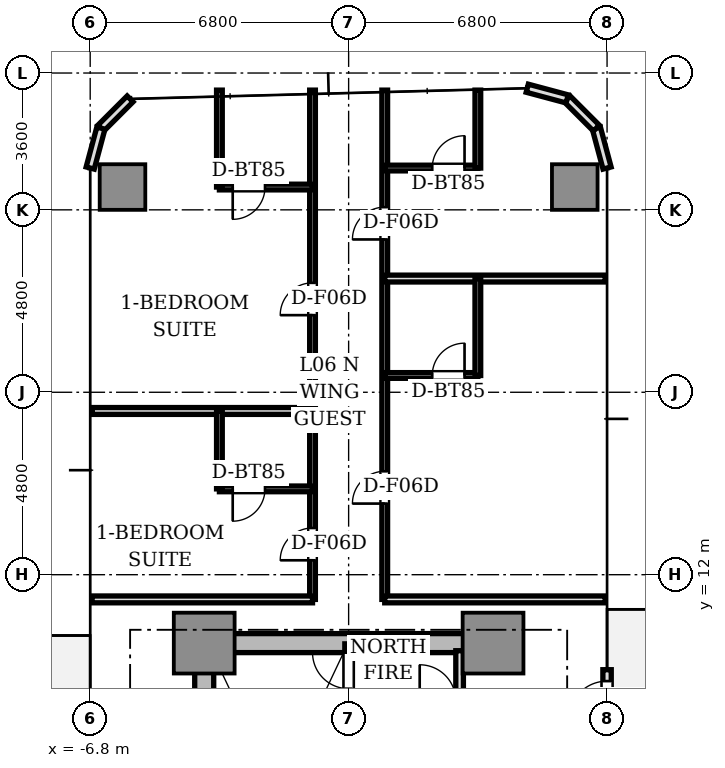
"""IFC4 building model, lengths in metres.
Left out: names, types, materials, properties, quantities, classifications, styles, units other than length and angle.
Written with IfcOpenShell. Run it as: python <this file> out.ifc"""

import sys

from ifc_helpers import new_model, si_unit, direction, frame, frame_2d, origin, origin_2d, place, context, subcontext, project, spatial, rectangle, extrude, source, transform, mapped, element, fill, save


model = new_model("IFC4")
c1 = context("Model", 3, precision=1e-05, world=origin(), true_north=direction((0.0, 1.0)))
c2 = subcontext(c1, "Body", "Model", "MODEL_VIEW")
j1 = project(units=[si_unit("LENGTHUNIT", "METRE"), si_unit("PLANEANGLEUNIT", "RADIAN")], contexts=[c1])
p1 = place(None, origin())
s1 = spatial("IfcSite", under=j1, at=p1, CompositionType="ELEMENT")
p2 = place(p1, origin())
s2 = spatial("IfcBuilding", under=s1, at=p2, CompositionType="ELEMENT")
p3 = place(p2, frame((0.0, 0.0, 26.45)))
s3 = spatial("IfcBuildingStorey", under=s2, at=p3, CompositionType="ELEMENT", Elevation=26.45)
p4 = place(p3, frame((-3.55, 10.2, 0.0), z_axis=(0.0, 0.0, 1.0), x_axis=(1.0, 0.0, 0.0)))
e1 = element("IfcWall", 1, at=p4, inside=s3, PredefinedType="SHEAR", context=c2, shape_type="SweptSolid", body=[
    extrude(rectangle(XDim=7.1, YDim=0.5, at=frame_2d((3.55, 0.0))), origin(), (0.0, 0.0, 1.0), 3.11),
])
p5 = place(p3, frame((-3.8, 2.85, 0.0), z_axis=(0.0, 0.0, 1.0), x_axis=(0.0, 1.0, 0.0)))
e2 = element("IfcWall", 2, at=p5, inside=s3, PredefinedType="SHEAR", context=c2, shape_type="SweptSolid", body=[
    extrude(rectangle(XDim=6.9, YDim=0.5, at=frame_2d((3.45, 0.0))), origin(), (0.0, 0.0, 1.0), 3.11),
])
m1 = source(origin(), c2, "Body", "SweptSolid", [
    extrude(rectangle(XDim=1.6, YDim=1.6, at=origin_2d()), origin(), (0.0, 0.0, 1.0), 3.11),
])
for number, where, z_axis, x_axis in (
    (3, (-3.8, 10.2, 0.0), (0.0, 0.0, 1.0), (1.0, 0.0, 0.0)),
    (4, (3.8, 10.2, 0.0), (0.0, 0.0, 1.0), (1.0, 0.0, 0.0)),
):
    element("IfcColumn", number, at=place(p3, frame(where, z_axis=z_axis, x_axis=x_axis)), inside=s3, PredefinedType="COLUMN", context=c2, shape_type="MappedRepresentation", body=[
        mapped(m1, transform((0.0, 0.0, 0.0), scale=1.0)),
    ])
m2 = source(origin(), c2, "Body", "SweptSolid", [
    extrude(rectangle(XDim=1.2, YDim=1.2, at=origin_2d()), origin(), (0.0, 0.0, 1.0), 3.11),
])
for number, where, z_axis, x_axis in (
    (5, (5.95, 22.2, 0.0), (0.0, 0.0, 1.0), (1.0, 0.0, 0.0)),
    (6, (-5.95, 22.2, 0.0), (0.0, 0.0, 1.0), (1.0, 0.0, 0.0)),
):
    element("IfcColumn", number, at=place(p3, frame(where, z_axis=z_axis, x_axis=x_axis)), inside=s3, PredefinedType="COLUMN", context=c2, shape_type="MappedRepresentation", body=[
        mapped(m2, transform((0.0, 0.0, 0.0), scale=1.0)),
    ])
p6 = place(p3, frame((6.8, 6.8, 0.0), z_axis=(0.0, 0.0, 1.0), x_axis=(0.0, 1.0, 0.0)))
e7 = element("IfcWall", 7, at=p6, inside=s3, PredefinedType="STANDARD", context=c2, shape_type="SweptSolid", body=[
    extrude(rectangle(XDim=2.7, YDim=0.22, at=frame_2d((1.35, 0.0))), origin(), (0.0, 0.0, 1.0), 3.11),
])
p7 = place(p6, frame((1.4, 0.0, 0.0)))
e8 = element("IfcOpeningElement", 8, at=p7, cuts=e7, PredefinedType="OPENING", context=c2, shape_type="SweptSolid", body=[
    extrude(rectangle(XDim=1.0, YDim=2.2, at=frame_2d((0.5, 1.1))), frame((0.0, 0.12, 0.0), z_axis=(0.0, -1.0, 0.0), x_axis=(1.0, 0.0, 0.0)), (0.0, 0.0, 1.0), 0.24),
])
for number, where, z_axis, x_axis in (
    (9, (6.8, 22.7, 0.0), (0.0, 0.0, 1.0), (-0.259, 0.966, 0.0)),
    (10, (6.519, 23.75, 0.0), (0.0, 0.0, 1.0), (-0.707, 0.707, 0.0)),
    (11, (5.75, 24.519, 0.0), (0.0, 0.0, 1.0), (-0.966, 0.259, 0.0)),
    (12, (-5.75, 24.519, 0.0), (0.0, 0.0, 1.0), (-0.707, -0.707, 0.0)),
    (13, (-6.519, 23.75, 0.0), (0.0, 0.0, 1.0), (-0.259, -0.966, 0.0)),
):
    element("IfcWall", number, at=place(p3, frame(where, z_axis=z_axis, x_axis=x_axis)), inside=s3, PredefinedType="STANDARD", context=c2, shape_type="SweptSolid", body=[
        extrude(rectangle(XDim=1.087, YDim=0.22, at=frame_2d((0.543, 0.0))), origin(), (0.0, 0.0, 1.0), 3.11),
    ])
p8 = place(p3, frame((0.0, 2.5, 0.0), z_axis=(0.0, 0.0, 1.0), x_axis=(0.0, 1.0, 0.0)))
e14 = element("IfcWall", 14, at=p8, inside=s3, PredefinedType="SOLIDWALL", context=c2, shape_type="SweptSolid", body=[
    extrude(rectangle(XDim=7.68, YDim=0.2, at=frame_2d((3.84, 0.0))), origin(), (0.0, 0.0, 1.0), 3.11),
])
p9 = place(p8, frame((6.5, 0.0, 0.0)))
e15 = element("IfcOpeningElement", 15, at=p9, cuts=e14, PredefinedType="OPENING", context=c2, shape_type="SweptSolid", body=[
    extrude(rectangle(XDim=0.95, YDim=2.15, at=frame_2d((0.475, 1.075))), frame((0.0, 0.11, 0.0), z_axis=(0.0, -1.0, 0.0), x_axis=(1.0, 0.0, 0.0)), (0.0, 0.0, 1.0), 0.22),
])
p10 = place(p3, frame((2.92, 8.68, 0.0), z_axis=(0.0, 0.0, 1.0), x_axis=(0.0, 1.0, 0.0)))
e16 = element("IfcWall", 16, at=p10, inside=s3, PredefinedType="SOLIDWALL", context=c2, shape_type="SweptSolid", body=[
    extrude(rectangle(XDim=1.32, YDim=0.2, at=frame_2d((0.66, 0.0))), origin(), (0.0, 0.0, 1.0), 2.66),
])
p11 = place(p3, frame((-0.95, 11.35, 0.0), z_axis=(0.0, 0.0, 1.0), x_axis=(0.0, 1.0, 0.0)))
e17 = element("IfcWall", 17, at=p11, inside=s3, PredefinedType="PARTITIONING", context=c2, shape_type="SweptSolid", body=[
    extrude(rectangle(XDim=13.4, YDim=0.15, at=frame_2d((6.7, 0.0))), origin(), (0.0, 0.0, 1.0), 2.66),
])
p12 = place(p11, frame((1.029, 0.0, 0.0)))
e18 = element("IfcOpeningElement", 18, at=p12, cuts=e17, PredefinedType="OPENING", context=c2, shape_type="SweptSolid", body=[
    extrude(rectangle(XDim=0.85, YDim=2.1, at=frame_2d((0.425, 1.05))), frame((0.0, 0.085, 0.0), z_axis=(0.0, -1.0, 0.0), x_axis=(1.0, 0.0, 0.0)), (0.0, 0.0, 1.0), 0.17),
])
p13 = place(p11, frame((7.479, 0.0, 0.0)))
e19 = element("IfcOpeningElement", 19, at=p13, cuts=e17, PredefinedType="OPENING", context=c2, shape_type="SweptSolid", body=[
    extrude(rectangle(XDim=0.85, YDim=2.1, at=frame_2d((0.425, 1.05))), frame((0.0, 0.085, 0.0), z_axis=(0.0, -1.0, 0.0), x_axis=(1.0, 0.0, 0.0)), (0.0, 0.0, 1.0), 0.17),
])
p14 = place(p3, frame((0.95, 11.35, 0.0), z_axis=(0.0, 0.0, 1.0), x_axis=(0.0, 1.0, 0.0)))
e20 = element("IfcWall", 20, at=p14, inside=s3, PredefinedType="PARTITIONING", context=c2, shape_type="SweptSolid", body=[
    extrude(rectangle(XDim=13.4, YDim=0.15, at=frame_2d((6.7, 0.0))), origin(), (0.0, 0.0, 1.0), 2.66),
])
p15 = place(p14, frame((2.521, 0.0, 0.0)))
e21 = element("IfcOpeningElement", 21, at=p15, cuts=e20, PredefinedType="OPENING", context=c2, shape_type="SweptSolid", body=[
    extrude(rectangle(XDim=0.85, YDim=2.1, at=frame_2d((0.425, 1.05))), frame((0.0, 0.085, 0.0), z_axis=(0.0, -1.0, 0.0), x_axis=(1.0, 0.0, 0.0)), (0.0, 0.0, 1.0), 0.17),
])
p16 = place(p14, frame((9.471, 0.0, 0.0)))
e22 = element("IfcOpeningElement", 22, at=p16, cuts=e20, PredefinedType="OPENING", context=c2, shape_type="SweptSolid", body=[
    extrude(rectangle(XDim=0.85, YDim=2.1, at=frame_2d((0.425, 1.05))), frame((0.0, 0.085, 0.0), z_axis=(0.0, -1.0, 0.0), x_axis=(1.0, 0.0, 0.0)), (0.0, 0.0, 1.0), 0.17),
])
for number, where, z_axis, x_axis in (
    (23, (-0.95, 11.35, 0.0), (0.0, 0.0, 1.0), (-1.0, 0.0, 0.0)),
    (24, (6.75, 11.35, 0.0), (0.0, 0.0, 1.0), (-1.0, 0.0, 0.0)),
    (25, (-0.95, 16.308, 0.0), (0.0, 0.0, 1.0), (-1.0, 0.0, 0.0)),
):
    element("IfcWall", number, at=place(p3, frame(where, z_axis=z_axis, x_axis=x_axis)), inside=s3, PredefinedType="PARTITIONING", context=c2, shape_type="SweptSolid", body=[
        extrude(rectangle(XDim=5.8, YDim=0.18, at=frame_2d((2.9, 0.0))), origin(), (0.0, 0.0, 1.0), 2.66),
    ])
p17 = place(p3, frame((-0.95, 14.258, 0.0), z_axis=(0.0, 0.0, 1.0), x_axis=(-1.0, 0.0, 0.0)))
e26 = element("IfcWall", 26, at=p17, inside=s3, PredefinedType="PARTITIONING", context=c2, shape_type="SweptSolid", body=[
    extrude(rectangle(XDim=2.45, YDim=0.15, at=frame_2d((1.225, 0.0))), origin(), (0.0, 0.0, 1.0), 2.66),
])
p18 = place(p17, frame((1.25, 0.0, 0.0)))
e27 = element("IfcOpeningElement", 27, at=p18, cuts=e26, PredefinedType="OPENING", context=c2, shape_type="SweptSolid", body=[
    extrude(rectangle(XDim=0.85, YDim=2.1, at=frame_2d((0.425, 1.05))), frame((0.0, 0.085, 0.0), z_axis=(0.0, -1.0, 0.0), x_axis=(1.0, 0.0, 0.0)), (0.0, 0.0, 1.0), 0.17),
])
p19 = place(p3, frame((-3.4, 14.258, 0.0), z_axis=(0.0, 0.0, 1.0), x_axis=(0.0, 1.0, 0.0)))
e28 = element("IfcWall", 28, at=p19, inside=s3, PredefinedType="PARTITIONING", context=c2, shape_type="SweptSolid", body=[
    extrude(rectangle(XDim=2.05, YDim=0.15, at=frame_2d((1.025, 0.0))), origin(), (0.0, 0.0, 1.0), 2.66),
])
p20 = place(p3, frame((-0.95, 22.2, 0.0), z_axis=(0.0, 0.0, 1.0), x_axis=(-1.0, 0.0, 0.0)))
e29 = element("IfcWall", 29, at=p20, inside=s3, PredefinedType="PARTITIONING", context=c2, shape_type="SweptSolid", body=[
    extrude(rectangle(XDim=2.45, YDim=0.15, at=frame_2d((1.225, 0.0))), origin(), (0.0, 0.0, 1.0), 2.58),
])
p21 = place(p20, frame((1.25, 0.0, 0.0)))
e30 = element("IfcOpeningElement", 30, at=p21, cuts=e29, PredefinedType="OPENING", context=c2, shape_type="SweptSolid", body=[
    extrude(rectangle(XDim=0.85, YDim=2.1, at=frame_2d((0.425, 1.05))), frame((0.0, 0.085, 0.0), z_axis=(0.0, -1.0, 0.0), x_axis=(1.0, 0.0, 0.0)), (0.0, 0.0, 1.0), 0.17),
])
p22 = place(p3, frame((-3.4, 22.2, 0.0), z_axis=(0.0, 0.0, 1.0), x_axis=(0.0, 1.0, 0.0)))
e31 = element("IfcWall", 31, at=p22, inside=s3, PredefinedType="PARTITIONING", context=c2, shape_type="SweptSolid", body=[
    extrude(rectangle(XDim=2.55, YDim=0.15, at=frame_2d((1.275, 0.0))), origin(), (0.0, 0.0, 1.0), 2.66),
])
p23 = place(p3, frame((0.95, 19.792, 0.0), z_axis=(0.0, 0.0, 1.0), x_axis=(1.0, 0.0, 0.0)))
e32 = element("IfcWall", 32, at=p23, inside=s3, PredefinedType="PARTITIONING", context=c2, shape_type="SweptSolid", body=[
    extrude(rectangle(XDim=5.8, YDim=0.18, at=frame_2d((2.9, 0.0))), origin(), (0.0, 0.0, 1.0), 2.66),
])
p24 = place(p3, frame((0.95, 17.242, 0.0), z_axis=(0.0, 0.0, 1.0), x_axis=(1.0, 0.0, 0.0)))
e33 = element("IfcWall", 33, at=p24, inside=s3, PredefinedType="PARTITIONING", context=c2, shape_type="SweptSolid", body=[
    extrude(rectangle(XDim=2.45, YDim=0.15, at=frame_2d((1.225, 0.0))), origin(), (0.0, 0.0, 1.0), 2.66),
])
p25 = place(p24, frame((1.25, 0.0, 0.0)))
e34 = element("IfcOpeningElement", 34, at=p25, cuts=e33, PredefinedType="OPENING", context=c2, shape_type="SweptSolid", body=[
    extrude(rectangle(XDim=0.85, YDim=2.1, at=frame_2d((0.425, 1.05))), frame((0.0, 0.085, 0.0), z_axis=(0.0, -1.0, 0.0), x_axis=(1.0, 0.0, 0.0)), (0.0, 0.0, 1.0), 0.17),
])
p26 = place(p3, frame((3.4, 17.242, 0.0), z_axis=(0.0, 0.0, 1.0), x_axis=(0.0, 1.0, 0.0)))
e35 = element("IfcWall", 35, at=p26, inside=s3, PredefinedType="PARTITIONING", context=c2, shape_type="SweptSolid", body=[
    extrude(rectangle(XDim=2.55, YDim=0.15, at=frame_2d((1.275, 0.0))), origin(), (0.0, 0.0, 1.0), 2.66),
])
p27 = place(p3, frame((0.95, 22.7, 0.0), z_axis=(0.0, 0.0, 1.0), x_axis=(1.0, 0.0, 0.0)))
e36 = element("IfcWall", 36, at=p27, inside=s3, PredefinedType="PARTITIONING", context=c2, shape_type="SweptSolid", body=[
    extrude(rectangle(XDim=2.45, YDim=0.15, at=frame_2d((1.225, 0.0))), origin(), (0.0, 0.0, 1.0), 2.66),
])
p28 = place(p27, frame((1.25, 0.0, 0.0)))
e37 = element("IfcOpeningElement", 37, at=p28, cuts=e36, PredefinedType="OPENING", context=c2, shape_type="SweptSolid", body=[
    extrude(rectangle(XDim=0.85, YDim=2.1, at=frame_2d((0.425, 1.05))), frame((0.0, 0.085, 0.0), z_axis=(0.0, -1.0, 0.0), x_axis=(1.0, 0.0, 0.0)), (0.0, 0.0, 1.0), 0.17),
])
p29 = place(p3, frame((3.4, 22.7, 0.0), z_axis=(0.0, 0.0, 1.0), x_axis=(0.0, 1.0, 0.0)))
e38 = element("IfcWall", 38, at=p29, inside=s3, PredefinedType="PARTITIONING", context=c2, shape_type="SweptSolid", body=[
    extrude(rectangle(XDim=2.05, YDim=0.15, at=frame_2d((1.025, 0.0))), origin(), (0.0, 0.0, 1.0), 2.66),
])
m3 = source(origin(), c2, "Body", "SweptSolid", [
    extrude(rectangle(XDim=1.0, YDim=0.05, at=origin_2d()), origin(), (0.0, 0.0, 1.0), 2.2),
])
p30 = place(p7, frame((0.5, 0.0, 0.0)))
e39 = element("IfcDoor", 39, at=p30, inside=s3, OperationType="SINGLE_SWING_LEFT", PredefinedType="DOOR", context=c2, shape_type="MappedRepresentation", body=[
    mapped(m3, transform((0.0, 0.0, 0.0), scale=1.0)),
])
fill(e8, e39)
m4 = source(origin(), c2, "Body", "SweptSolid", [
    extrude(rectangle(XDim=0.95, YDim=0.05, at=origin_2d()), origin(), (0.0, 0.0, 1.0), 2.15),
])
p31 = place(p9, frame((0.475, 0.0, 0.0)))
e40 = element("IfcDoor", 40, at=p31, inside=s3, OperationType="SINGLE_SWING_RIGHT", PredefinedType="DOOR", context=c2, shape_type="MappedRepresentation", body=[
    mapped(m4, transform((0.0, 0.0, 0.0), scale=1.0)),
])
fill(e15, e40)
m5 = source(origin(), c2, "Body", "SweptSolid", [
    extrude(rectangle(XDim=0.85, YDim=0.05, at=origin_2d()), origin(), (0.0, 0.0, 1.0), 2.1),
])
p32 = place(p18, frame((0.425, 0.0, 0.0)))
e41 = element("IfcDoor", 41, at=p32, inside=s3, OperationType="SINGLE_SWING_RIGHT", PredefinedType="DOOR", context=c2, shape_type="MappedRepresentation", body=[
    mapped(m5, transform((0.0, 0.0, 0.0), scale=1.0)),
])
fill(e27, e41)
p33 = place(p12, frame((0.425, 0.0, 0.0)))
e42 = element("IfcDoor", 42, at=p33, inside=s3, OperationType="SINGLE_SWING_LEFT", PredefinedType="DOOR", context=c2, shape_type="MappedRepresentation", body=[
    mapped(m5, transform((0.0, 0.0, 0.0), scale=1.0)),
])
fill(e18, e42)
p34 = place(p21, frame((0.425, 0.0, 0.0)))
e43 = element("IfcDoor", 43, at=p34, inside=s3, OperationType="SINGLE_SWING_RIGHT", PredefinedType="DOOR", context=c2, shape_type="MappedRepresentation", body=[
    mapped(m5, transform((0.0, 0.0, 0.0), scale=1.0)),
])
fill(e30, e43)
p35 = place(p13, frame((0.425, 0.0, 0.0)))
e44 = element("IfcDoor", 44, at=p35, inside=s3, OperationType="SINGLE_SWING_LEFT", PredefinedType="DOOR", context=c2, shape_type="MappedRepresentation", body=[
    mapped(m5, transform((0.0, 0.0, 0.0), scale=1.0)),
])
fill(e19, e44)
p36 = place(p25, frame((0.425, 0.0, 0.0)))
e45 = element("IfcDoor", 45, at=p36, inside=s3, OperationType="SINGLE_SWING_RIGHT", PredefinedType="DOOR", context=c2, shape_type="MappedRepresentation", body=[
    mapped(m5, transform((0.0, 0.0, 0.0), scale=1.0)),
])
fill(e34, e45)
p37 = place(p15, frame((0.425, 0.0, 0.0)))
e46 = element("IfcDoor", 46, at=p37, inside=s3, OperationType="SINGLE_SWING_LEFT", PredefinedType="DOOR", context=c2, shape_type="MappedRepresentation", body=[
    mapped(m5, transform((0.0, 0.0, 0.0), scale=1.0)),
])
fill(e21, e46)
p38 = place(p28, frame((0.425, 0.0, 0.0)))
e47 = element("IfcDoor", 47, at=p38, inside=s3, OperationType="SINGLE_SWING_RIGHT", PredefinedType="DOOR", context=c2, shape_type="MappedRepresentation", body=[
    mapped(m5, transform((0.0, 0.0, 0.0), scale=1.0)),
])
fill(e37, e47)
p39 = place(p16, frame((0.425, 0.0, 0.0)))
e48 = element("IfcDoor", 48, at=p39, inside=s3, OperationType="SINGLE_SWING_LEFT", PredefinedType="DOOR", context=c2, shape_type="MappedRepresentation", body=[
    mapped(m5, transform((0.0, 0.0, 0.0), scale=1.0)),
])
fill(e22, e48)
save(model, sys.argv[1])
